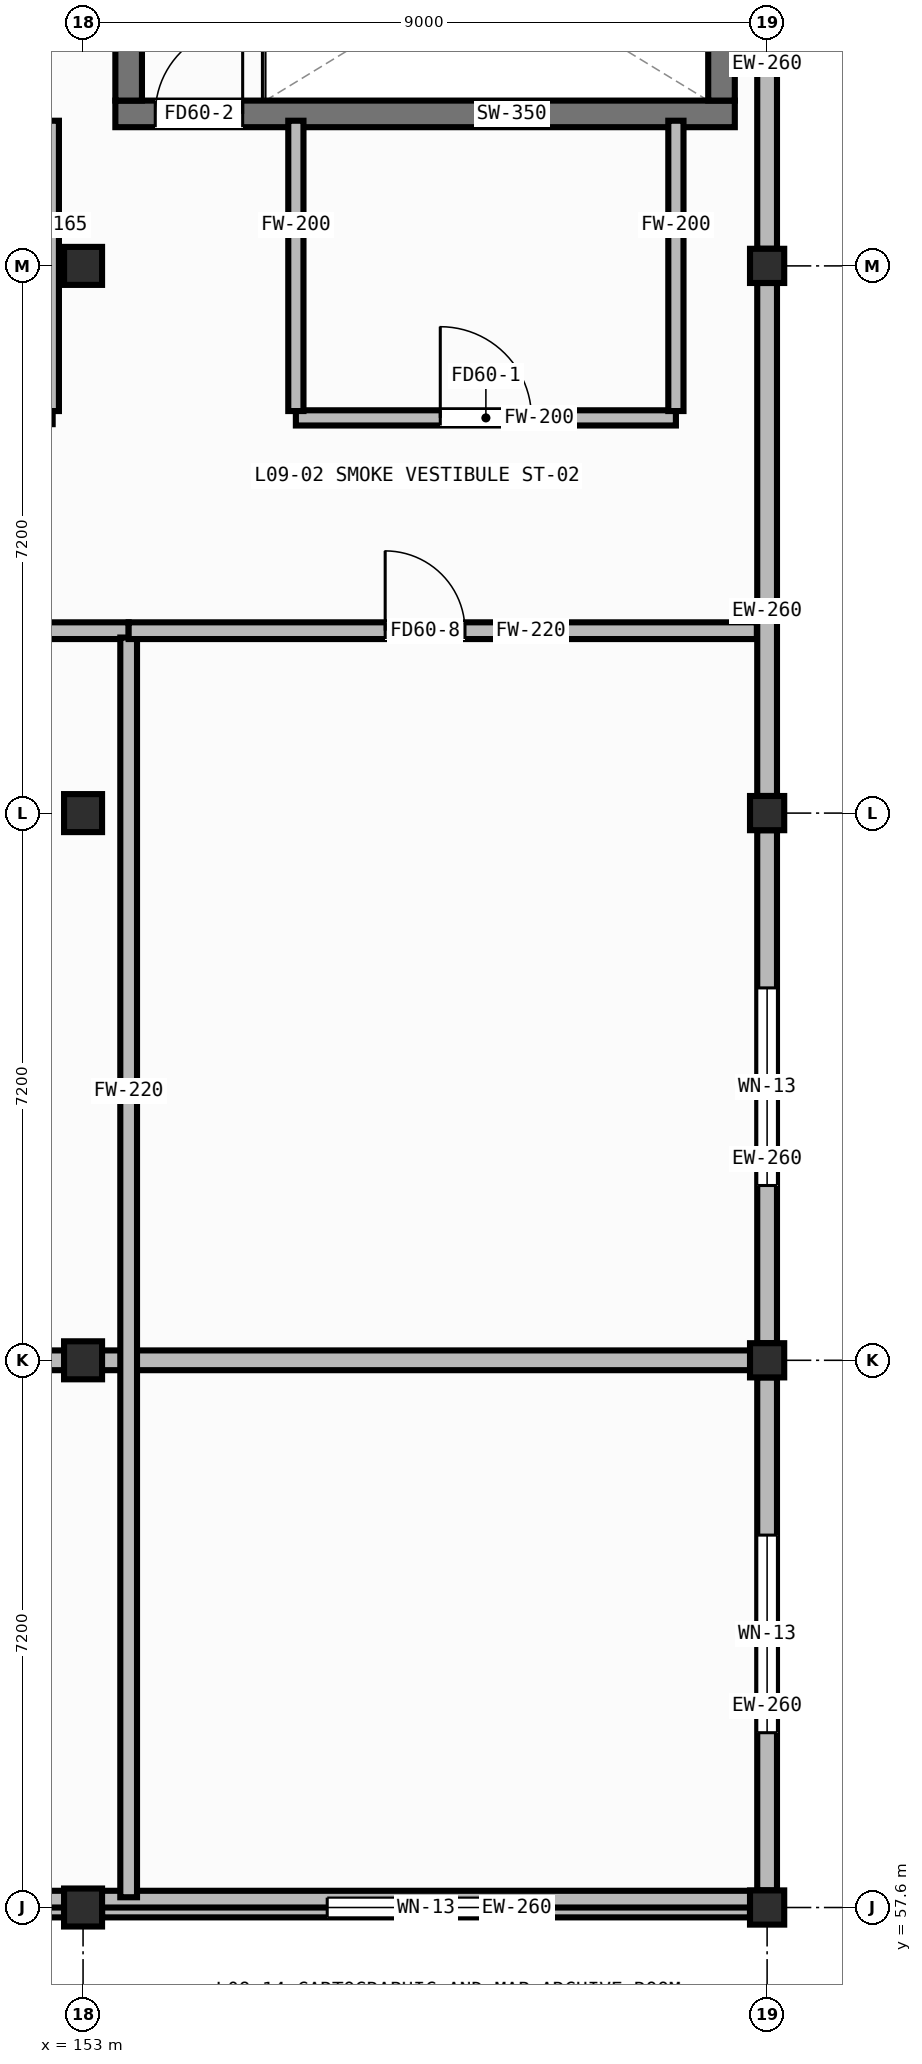
"""IFC4 building model, lengths in metres.
Left out: names, types, materials, properties, quantities, classifications, styles, units other than length and angle.
Written with IfcOpenShell. Run it as: python <this file> out.ifc"""

import sys

from ifc_helpers import new_model, si_unit, direction, frame, frame_2d, origin, origin_2d, place, context, subcontext, project, spatial, rectangle, hollow_rectangle, extrude, element, fill, save


model = new_model("IFC4")
c1 = context("Model", 3, precision=1e-05, world=origin(), true_north=direction((0.0, 1.0)))
c2 = subcontext(c1, "Body", "Model", "MODEL_VIEW")
j1 = project(units=[si_unit("LENGTHUNIT", "METRE"), si_unit("PLANEANGLEUNIT", "RADIAN")], contexts=[c1])
p1 = place(None, origin())
s1 = spatial("IfcSite", under=j1, at=p1, CompositionType="ELEMENT")
p2 = place(p1, origin())
s2 = spatial("IfcBuilding", under=s1, at=p2, CompositionType="ELEMENT")
p3 = place(p2, frame((0.0, 0.0, 31.4)))
s3 = spatial("IfcBuildingStorey", under=s2, at=p3, CompositionType="ELEMENT", Elevation=31.4)
for number, where, z_axis, x_axis in (
    (1, (153.0, 57.6, 0.0), (0.0, 0.0, 1.0), (1.0, 0.0, 0.0)),
    (2, (153.0, 64.8, 0.0), (0.0, 0.0, 1.0), (1.0, 0.0, 0.0)),
    (3, (153.0, 72.0, 0.0), (0.0, 0.0, 1.0), (1.0, 0.0, 0.0)),
    (4, (153.0, 79.2, 0.0), (0.0, 0.0, 1.0), (1.0, 0.0, 0.0)),
):
    element("IfcColumn", number, at=place(p3, frame(where, z_axis=z_axis, x_axis=x_axis)), inside=s3, PredefinedType="COLUMN", context=c2, shape_type="SweptSolid", body=[
        extrude(hollow_rectangle(XDim=0.5, YDim=0.5, WallThickness=0.022, at=origin_2d()), origin(), (0.0, 0.0, 1.0), 3.56),
    ])
for number, where, z_axis, x_axis in (
    (5, (162.0, 57.6, 0.0), (0.0, 0.0, 1.0), (1.0, 0.0, 0.0)),
    (6, (162.0, 64.8, 0.0), (0.0, 0.0, 1.0), (1.0, 0.0, 0.0)),
    (7, (162.0, 72.0, 0.0), (0.0, 0.0, 1.0), (1.0, 0.0, 0.0)),
    (8, (162.0, 79.2, 0.0), (0.0, 0.0, 1.0), (1.0, 0.0, 0.0)),
):
    element("IfcColumn", number, at=place(p3, frame(where, z_axis=z_axis, x_axis=x_axis)), inside=s3, PredefinedType="COLUMN", context=c2, shape_type="SweptSolid", body=[
        extrude(hollow_rectangle(XDim=0.45, YDim=0.45, WallThickness=0.019, at=origin_2d()), origin(), (0.0, 0.0, 1.0), 3.56),
    ])
p4 = place(p3, frame((144.25, 57.6, 0.0), z_axis=(0.0, 0.0, 1.0), x_axis=(1.0, 0.0, 0.0)))
e9 = element("IfcWall", 9, at=p4, inside=s3, PredefinedType="STANDARD", context=c2, shape_type="SweptSolid", body=[
    extrude(rectangle(XDim=8.5, YDim=0.26, at=frame_2d((4.25, 0.0))), origin(), (0.0, 0.0, 1.0), 3.16),
])
p5 = place(p4, frame((2.95, 0.0, 0.85)))
e10 = element("IfcOpeningElement", 10, at=p5, cuts=e9, PredefinedType="OPENING", context=c2, shape_type="SweptSolid", body=[
    extrude(rectangle(XDim=2.6, YDim=1.6, at=frame_2d((1.3, 0.8))), frame((0.0, 0.142, 0.0), z_axis=(0.0, -1.0, 0.0), x_axis=(1.0, 0.0, 0.0)), (0.0, 0.0, 1.0), 0.284),
])
p6 = place(p3, frame((153.25, 57.6, 0.0), z_axis=(0.0, 0.0, 1.0), x_axis=(1.0, 0.0, 0.0)))
e11 = element("IfcWall", 11, at=p6, inside=s3, PredefinedType="STANDARD", context=c2, shape_type="SweptSolid", body=[
    extrude(rectangle(XDim=8.525, YDim=0.26, at=frame_2d((4.262, 0.0))), origin(), (0.0, 0.0, 1.0), 3.16),
])
p7 = place(p6, frame((2.962, 0.0, 0.85)))
e12 = element("IfcOpeningElement", 12, at=p7, cuts=e11, PredefinedType="OPENING", context=c2, shape_type="SweptSolid", body=[
    extrude(rectangle(XDim=2.6, YDim=1.6, at=frame_2d((1.3, 0.8))), frame((0.0, 0.142, 0.0), z_axis=(0.0, -1.0, 0.0), x_axis=(1.0, 0.0, 0.0)), (0.0, 0.0, 1.0), 0.284),
])
p8 = place(p3, frame((162.0, 64.575, 0.0), z_axis=(0.0, 0.0, 1.0), x_axis=(0.0, -1.0, 0.0)))
e13 = element("IfcWall", 13, at=p8, inside=s3, PredefinedType="STANDARD", context=c2, shape_type="SweptSolid", body=[
    extrude(rectangle(XDim=6.75, YDim=0.26, at=frame_2d((3.375, 0.0))), origin(), (0.0, 0.0, 1.0), 3.16),
])
p9 = place(p8, frame((2.075, 0.0, 0.85)))
e14 = element("IfcOpeningElement", 14, at=p9, cuts=e13, PredefinedType="OPENING", context=c2, shape_type="SweptSolid", body=[
    extrude(rectangle(XDim=2.6, YDim=1.6, at=frame_2d((1.3, 0.8))), frame((0.0, 0.142, 0.0), z_axis=(0.0, -1.0, 0.0), x_axis=(1.0, 0.0, 0.0)), (0.0, 0.0, 1.0), 0.284),
])
p10 = place(p3, frame((162.0, 71.775, 0.0), z_axis=(0.0, 0.0, 1.0), x_axis=(0.0, -1.0, 0.0)))
e15 = element("IfcWall", 15, at=p10, inside=s3, PredefinedType="STANDARD", context=c2, shape_type="SweptSolid", body=[
    extrude(rectangle(XDim=6.75, YDim=0.26, at=frame_2d((3.375, 0.0))), origin(), (0.0, 0.0, 1.0), 3.16),
])
p11 = place(p10, frame((2.075, 0.0, 0.85)))
e16 = element("IfcOpeningElement", 16, at=p11, cuts=e15, PredefinedType="OPENING", context=c2, shape_type="SweptSolid", body=[
    extrude(rectangle(XDim=2.6, YDim=1.6, at=frame_2d((1.3, 0.8))), frame((0.0, 0.142, 0.0), z_axis=(0.0, -1.0, 0.0), x_axis=(1.0, 0.0, 0.0)), (0.0, 0.0, 1.0), 0.284),
])
for number, where, z_axis, x_axis in (
    (17, (162.0, 78.975, 0.0), (0.0, 0.0, 1.0), (0.0, -1.0, 0.0)),
    (18, (162.0, 86.175, 0.0), (0.0, 0.0, 1.0), (0.0, -1.0, 0.0)),
):
    element("IfcWall", number, at=place(p3, frame(where, z_axis=z_axis, x_axis=x_axis)), inside=s3, PredefinedType="STANDARD", context=c2, shape_type="SweptSolid", body=[
        extrude(rectangle(XDim=6.75, YDim=0.26, at=frame_2d((3.375, 0.0))), origin(), (0.0, 0.0, 1.0), 3.16),
    ])
p12 = place(p3, frame((126.2, 64.8, 3.8), z_axis=(0.0, 0.0, 1.0), x_axis=(1.0, 0.0, 0.0)))
e19 = element("IfcWall", 19, at=p12, inside=s3, PredefinedType="STANDARD", context=c2, shape_type="SweptSolid", body=[
    extrude(rectangle(XDim=35.6, YDim=0.26, at=frame_2d((17.8, 0.0))), origin(), (0.0, 0.0, 1.0), 1.92),
])
p13 = place(p3, frame((126.0, 57.71, 3.8), z_axis=(0.0, 0.0, 1.0), x_axis=(1.0, 0.0, 0.0)))
e20 = element("IfcWall", 20, at=p13, inside=s3, PredefinedType="PARAPET", context=c2, shape_type="SweptSolid", body=[
    extrude(rectangle(XDim=36.0, YDim=0.22, at=frame_2d((18.0, 0.0))), origin(), (0.0, 0.0, 1.0), 0.9),
])
p14 = place(p3, frame((153.425, 81.2, 0.0), z_axis=(0.0, 0.0, 1.0), x_axis=(1.0, 0.0, 0.0)))
e21 = element("IfcWall", 21, at=p14, inside=s3, PredefinedType="SHEAR", context=c2, shape_type="SweptSolid", body=[
    extrude(rectangle(XDim=8.15, YDim=0.35, at=frame_2d((4.075, 0.0))), origin(), (0.0, 0.0, 1.0), 3.56),
])
p15 = place(p14, frame((0.525, 0.0, 0.0)))
e22 = element("IfcOpeningElement", 22, at=p15, cuts=e21, PredefinedType="OPENING", context=c2, shape_type="SweptSolid", body=[
    extrude(rectangle(XDim=1.15, YDim=2.1, at=frame_2d((0.575, 1.05))), frame((0.0, 0.187, 0.0), z_axis=(0.0, -1.0, 0.0), x_axis=(1.0, 0.0, 0.0)), (0.0, 0.0, 1.0), 0.374),
])
for number, where, z_axis, x_axis in (
    (23, (153.6, 81.375, 0.0), (0.0, 0.0, 1.0), (0.0, 1.0, 0.0)),
    (24, (161.4, 81.375, 0.0), (0.0, 0.0, 1.0), (0.0, 1.0, 0.0)),
):
    element("IfcWall", number, at=place(p3, frame(where, z_axis=z_axis, x_axis=x_axis)), inside=s3, PredefinedType="SHEAR", context=c2, shape_type="SweptSolid", body=[
        extrude(rectangle(XDim=3.55, YDim=0.35, at=frame_2d((1.775, 0.0))), origin(), (0.0, 0.0, 1.0), 3.56),
    ])
p16 = place(p3, frame((155.8, 77.2, 0.0), z_axis=(0.0, 0.0, 1.0), x_axis=(1.0, 0.0, 0.0)))
e25 = element("IfcWall", 25, at=p16, inside=s3, PredefinedType="PARTITIONING", context=c2, shape_type="SweptSolid", body=[
    extrude(rectangle(XDim=5.0, YDim=0.2, at=frame_2d((2.5, 0.0))), origin(), (0.0, 0.0, 1.0), 3.56),
])
p17 = place(p16, frame((1.9, 0.0, 0.0)))
e26 = element("IfcOpeningElement", 26, at=p17, cuts=e25, PredefinedType="OPENING", context=c2, shape_type="SweptSolid", body=[
    extrude(rectangle(XDim=1.2, YDim=2.1, at=frame_2d((0.6, 1.05))), frame((0.0, 0.112, 0.0), z_axis=(0.0, -1.0, 0.0), x_axis=(1.0, 0.0, 0.0)), (0.0, 0.0, 1.0), 0.224),
])
for number, where, z_axis, x_axis in (
    (27, (155.8, 77.29, 0.0), (0.0, 0.0, 1.0), (0.0, 1.0, 0.0)),
    (28, (160.8, 77.29, 0.0), (0.0, 0.0, 1.0), (0.0, 1.0, 0.0)),
):
    element("IfcWall", number, at=place(p3, frame(where, z_axis=z_axis, x_axis=x_axis)), inside=s3, PredefinedType="PARTITIONING", context=c2, shape_type="SweptSolid", body=[
        extrude(rectangle(XDim=3.82, YDim=0.2, at=frame_2d((1.91, 0.0))), origin(), (0.0, 0.0, 1.0), 3.56),
    ])
p18 = place(p3, frame((152.6, 77.29, 0.0), z_axis=(0.0, 0.0, 1.0), x_axis=(0.0, 1.0, 0.0)))
e29 = element("IfcWall", 29, at=p18, inside=s3, PredefinedType="PARTITIONING", context=c2, shape_type="SweptSolid", body=[
    extrude(rectangle(XDim=3.82, YDim=0.165, at=frame_2d((1.91, 0.0))), origin(), (0.0, 0.0, 1.0), 3.56),
])
p19 = place(p3, frame((142.8, 74.4, 0.0), z_axis=(0.0, 0.0, 1.0), x_axis=(1.0, 0.0, 0.0)))
e30 = element("IfcWall", 30, at=p19, inside=s3, PredefinedType="PARTITIONING", context=c2, shape_type="SweptSolid", body=[
    extrude(rectangle(XDim=10.8, YDim=0.22, at=frame_2d((5.4, 0.0))), origin(), (0.0, 0.0, 1.0), 3.56),
])
p20 = place(p19, frame((5.125, 0.0, 0.0)))
e31 = element("IfcOpeningElement", 31, at=p20, cuts=e30, PredefinedType="OPENING", context=c2, shape_type="SweptSolid", body=[
    extrude(rectangle(XDim=1.15, YDim=2.1, at=frame_2d((0.575, 1.05))), frame((0.0, 0.122, 0.0), z_axis=(0.0, -1.0, 0.0), x_axis=(1.0, 0.0, 0.0)), (0.0, 0.0, 1.0), 0.244),
])
p21 = place(p3, frame((153.6, 57.735, 0.0), z_axis=(0.0, 0.0, 1.0), x_axis=(0.0, 1.0, 0.0)))
e32 = element("IfcWall", 32, at=p21, inside=s3, PredefinedType="PARTITIONING", context=c2, shape_type="SweptSolid", body=[
    extrude(rectangle(XDim=16.575, YDim=0.22, at=frame_2d((8.288, 0.0))), origin(), (0.0, 0.0, 1.0), 3.56),
])
p22 = place(p3, frame((153.6, 74.4, 0.0), z_axis=(0.0, 0.0, 1.0), x_axis=(1.0, 0.0, 0.0)))
e33 = element("IfcWall", 33, at=p22, inside=s3, PredefinedType="PARTITIONING", context=c2, shape_type="SweptSolid", body=[
    extrude(rectangle(XDim=8.265, YDim=0.22, at=frame_2d((4.132, 0.0))), origin(), (0.0, 0.0, 1.0), 3.56),
])
p23 = place(p22, frame((3.375, 0.0, 0.0)))
e34 = element("IfcOpeningElement", 34, at=p23, cuts=e33, PredefinedType="OPENING", context=c2, shape_type="SweptSolid", body=[
    extrude(rectangle(XDim=1.05, YDim=2.02, at=frame_2d((0.525, 1.01))), frame((0.0, 0.122, 0.0), z_axis=(0.0, -1.0, 0.0), x_axis=(1.0, 0.0, 0.0)), (0.0, 0.0, 1.0), 0.244),
])
p24 = place(p7, origin())
e35 = element("IfcWindow", 35, at=p24, inside=s3, PartitioningType="DOUBLE_PANEL_VERTICAL", PredefinedType="WINDOW", context=c2, shape_type="SweptSolid", body=[
    extrude(rectangle(XDim=2.6, YDim=1.6, at=frame_2d((1.3, 0.8))), frame((0.0, 0.03, 0.0), z_axis=(0.0, -1.0, 0.0), x_axis=(1.0, 0.0, 0.0)), (0.0, 0.0, 1.0), 0.06),
])
fill(e12, e35)
p25 = place(p9, origin())
e36 = element("IfcWindow", 36, at=p25, inside=s3, PartitioningType="DOUBLE_PANEL_VERTICAL", PredefinedType="WINDOW", context=c2, shape_type="SweptSolid", body=[
    extrude(rectangle(XDim=2.6, YDim=1.6, at=frame_2d((1.3, 0.8))), frame((0.0, 0.03, 0.0), z_axis=(0.0, -1.0, 0.0), x_axis=(1.0, 0.0, 0.0)), (0.0, 0.0, 1.0), 0.06),
])
fill(e14, e36)
p26 = place(p11, origin())
e37 = element("IfcWindow", 37, at=p26, inside=s3, PartitioningType="DOUBLE_PANEL_VERTICAL", PredefinedType="WINDOW", context=c2, shape_type="SweptSolid", body=[
    extrude(rectangle(XDim=2.6, YDim=1.6, at=frame_2d((1.3, 0.8))), frame((0.0, 0.03, 0.0), z_axis=(0.0, -1.0, 0.0), x_axis=(1.0, 0.0, 0.0)), (0.0, 0.0, 1.0), 0.06),
])
fill(e16, e37)
p27 = place(p15, origin())
e38 = element("IfcDoor", 38, at=p27, inside=s3, OperationType="SINGLE_SWING_RIGHT", PredefinedType="DOOR", context=c2, shape_type="SweptSolid", body=[
    extrude(rectangle(XDim=1.15, YDim=2.1, at=frame_2d((0.575, 1.05))), frame((0.0, 0.025, 0.0), z_axis=(0.0, -1.0, 0.0), x_axis=(1.0, 0.0, 0.0)), (0.0, 0.0, 1.0), 0.05),
])
fill(e22, e38)
p28 = place(p17, origin())
e39 = element("IfcDoor", 39, at=p28, inside=s3, OperationType="SINGLE_SWING_LEFT", PredefinedType="DOOR", context=c2, shape_type="SweptSolid", body=[
    extrude(rectangle(XDim=1.2, YDim=2.1, at=frame_2d((0.6, 1.05))), frame((0.0, 0.025, 0.0), z_axis=(0.0, -1.0, 0.0), x_axis=(1.0, 0.0, 0.0)), (0.0, 0.0, 1.0), 0.05),
])
fill(e26, e39)
p29 = place(p23, origin())
e40 = element("IfcDoor", 40, at=p29, inside=s3, OperationType="SINGLE_SWING_LEFT", PredefinedType="DOOR", context=c2, shape_type="SweptSolid", body=[
    extrude(rectangle(XDim=1.05, YDim=2.02, at=frame_2d((0.525, 1.01))), frame((0.0, 0.025, 0.0), z_axis=(0.0, -1.0, 0.0), x_axis=(1.0, 0.0, 0.0)), (0.0, 0.0, 1.0), 0.05),
])
fill(e34, e40)
save(model, sys.argv[1])
